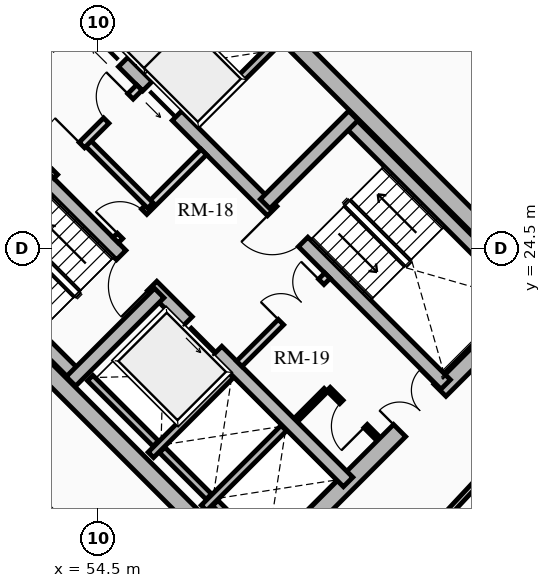
"""IFC4 building model, lengths in metres.
Left out: names, types, materials, properties, quantities, classifications, styles, units other than length and angle.
Written with IfcOpenShell. Run it as: python <this file> out.ifc"""

import sys

from ifc_helpers import new_model, si_unit, direction, frame, frame_2d, origin, place, context, subcontext, project, spatial, rectangle, extrude, source, transform, mapped, element, fill, save


model = new_model("IFC4")
c1 = context("Model", 3, precision=1e-05, world=origin(), true_north=direction((0.0, 1.0)))
c2 = subcontext(c1, "Body", "Model", "MODEL_VIEW")
j1 = project(units=[si_unit("LENGTHUNIT", "METRE"), si_unit("PLANEANGLEUNIT", "RADIAN")], contexts=[c1])
p1 = place(None, origin())
s1 = spatial("IfcSite", under=j1, at=p1, CompositionType="ELEMENT")
p2 = place(p1, origin())
s2 = spatial("IfcBuilding", under=s1, at=p2, CompositionType="ELEMENT")
p3 = place(p2, frame((0.0, 0.0, 116.71)))
s3 = spatial("IfcBuildingStorey", under=s2, at=p3, CompositionType="ELEMENT", Elevation=116.71)
for number, where, z_axis, x_axis in (
    (1, (58.737, 15.697, 0.0), (0.0, 0.0, 1.0), (-0.707, 0.707, 0.0)),
    (2, (66.303, 23.263, 0.0), (0.0, 0.0, 1.0), (-0.707, 0.707, 0.0)),
):
    element("IfcWall", number, at=place(p3, frame(where, z_axis=z_axis, x_axis=x_axis)), inside=s3, PredefinedType="SHEAR", context=c2, shape_type="SweptSolid", body=[
        extrude(rectangle(XDim=14.2, YDim=0.45, at=frame_2d((7.1, 0.0))), origin(), (0.0, 0.0, 1.0), 2.91),
    ])
p4 = place(p3, frame((58.578, 15.856, 0.0), z_axis=(0.0, 0.0, 1.0), x_axis=(0.707106781187, 0.707106781187, 0.0)))
e3 = element("IfcWall", 3, at=p4, inside=s3, PredefinedType="SHEAR", context=c2, shape_type="SweptSolid", body=[
    extrude(rectangle(XDim=10.7, YDim=0.45, at=frame_2d((5.35, 0.0))), origin(), (0.0, 0.0, 1.0), 2.91),
])
m1 = source(origin(), c2, "Body", "SweptSolid", [
    extrude(rectangle(XDim=1.5, YDim=2.02, at=frame_2d((0.75, 1.01))), frame((0.0, 0.235, 0.0), z_axis=(0.0, -1.0, 0.0), x_axis=(1.0, 0.0, 0.0)), (0.0, 0.0, 1.0), 0.47),
])
p5 = place(p4, frame((5.45, 0.0, 0.0)))
e4 = element("IfcOpeningElement", 4, at=p5, cuts=e3, PredefinedType="OPENING", context=c2, shape_type="MappedRepresentation", body=[
    mapped(m1, transform((0.0, 0.0, 0.0), x_axis=(1.0, 0.0, 0.0), y_axis=(0.0, 1.0, 0.0), z_axis=(0.0, 0.0, 1.0), scale=1.0)),
])
p6 = place(p3, frame((48.856, 25.578, 0.0), z_axis=(0.0, 0.0, 1.0), x_axis=(0.707106781187, 0.707106781187, 0.0)))
e5 = element("IfcWall", 5, at=p6, inside=s3, PredefinedType="SHEAR", context=c2, shape_type="SweptSolid", body=[
    extrude(rectangle(XDim=10.7, YDim=0.45, at=frame_2d((5.35, 0.0))), origin(), (0.0, 0.0, 1.0), 2.91),
])
p7 = place(p6, frame((4.6, 0.0, 0.0)))
e6 = element("IfcOpeningElement", 6, at=p7, cuts=e5, PredefinedType="OPENING", context=c2, shape_type="MappedRepresentation", body=[
    mapped(m1, transform((0.0, 0.0, 0.0), x_axis=(1.0, 0.0, 0.0), y_axis=(0.0, 1.0, 0.0), z_axis=(0.0, 0.0, 1.0), scale=1.0)),
])
p8 = place(p3, frame((61.078, 18.355, 0.0), z_axis=(0.0, 0.0, 1.0), x_axis=(-0.707106781187, 0.707106781187, 0.0)))
e7 = element("IfcWall", 7, at=p8, inside=s3, PredefinedType="SHEAR", context=c2, shape_type="SweptSolid", body=[
    extrude(rectangle(XDim=13.75, YDim=0.35, at=frame_2d((6.875, 0.0))), origin(), (0.0, 0.0, 1.0), 2.91),
])
m2 = source(origin(), c2, "Body", "SweptSolid", [
    extrude(rectangle(XDim=1.1, YDim=2.015, at=frame_2d((0.55, 1.007))), frame((0.0, 0.185, 0.0), z_axis=(0.0, -1.0, 0.0), x_axis=(1.0, 0.0, 0.0)), (0.0, 0.0, 1.0), 0.37),
])
p9 = place(p8, frame((4.875, 0.0, 0.0)))
e8 = element("IfcOpeningElement", 8, at=p9, cuts=e7, PredefinedType="OPENING", context=c2, shape_type="MappedRepresentation", body=[
    mapped(m2, transform((0.0, 0.0, 0.0), x_axis=(1.0, 0.0, 0.0), y_axis=(0.0, 1.0, 0.0), z_axis=(0.0, 0.0, 1.0), scale=1.0)),
])
m3 = source(origin(), c2, "Body", "SweptSolid", [
    extrude(rectangle(XDim=1.15, YDim=2.02, at=frame_2d((0.575, 1.01))), frame((0.0, 0.185, 0.0), z_axis=(0.0, -1.0, 0.0), x_axis=(1.0, 0.0, 0.0)), (0.0, 0.0, 1.0), 0.37),
])
p10 = place(p8, frame((7.295, 0.0, 0.0)))
e9 = element("IfcOpeningElement", 9, at=p10, cuts=e7, PredefinedType="OPENING", context=c2, shape_type="MappedRepresentation", body=[
    mapped(m3, transform((0.0, 0.0, 0.0), x_axis=(1.0, 0.0, 0.0), y_axis=(0.0, 1.0, 0.0), z_axis=(0.0, 0.0, 1.0), scale=1.0)),
])
p11 = place(p3, frame((63.645, 20.922, 0.0), z_axis=(0.0, 0.0, 1.0), x_axis=(-0.707106781187, 0.707106781187, 0.0)))
e10 = element("IfcWall", 10, at=p11, inside=s3, PredefinedType="SHEAR", context=c2, shape_type="SweptSolid", body=[
    extrude(rectangle(XDim=13.75, YDim=0.35, at=frame_2d((6.875, 0.0))), origin(), (0.0, 0.0, 1.0), 2.91),
])
p12 = place(p11, frame((10.0, 0.0, 0.0)))
e11 = element("IfcOpeningElement", 11, at=p12, cuts=e10, PredefinedType="OPENING", context=c2, shape_type="MappedRepresentation", body=[
    mapped(m2, transform((0.0, 0.0, 0.0), x_axis=(1.0, 0.0, 0.0), y_axis=(0.0, 1.0, 0.0), z_axis=(0.0, 0.0, 1.0), scale=1.0)),
])
p13 = place(p11, frame((12.0, 0.0, 0.0)))
e12 = element("IfcOpeningElement", 12, at=p13, cuts=e10, PredefinedType="OPENING", context=c2, shape_type="MappedRepresentation", body=[
    mapped(m2, transform((0.0, 0.0, 0.0), x_axis=(1.0, 0.0, 0.0), y_axis=(0.0, 1.0, 0.0), z_axis=(0.0, 0.0, 1.0), scale=1.0)),
])
p14 = place(p11, frame((5.305, 0.0, 0.0)))
e13 = element("IfcOpeningElement", 13, at=p14, cuts=e10, PredefinedType="OPENING", context=c2, shape_type="MappedRepresentation", body=[
    mapped(m3, transform((0.0, 0.0, 0.0), x_axis=(1.0, 0.0, 0.0), y_axis=(0.0, 1.0, 0.0), z_axis=(0.0, 0.0, 1.0), scale=1.0)),
])
p15 = place(p3, frame((53.922, 21.141, 0.0), z_axis=(0.0, 0.0, 1.0), x_axis=(-0.707088616009, 0.707124945897, 0.0)))
e14 = element("IfcWall", 14, at=p15, inside=s3, PredefinedType="SHEAR", context=c2, shape_type="SweptSolid", body=[
    extrude(rectangle(XDim=6.72, YDim=0.35, at=frame_2d((3.36, 0.0))), origin(), (0.0, 0.0, 1.0), 2.91),
])
p16 = place(p3, frame((53.784, 21.003, 0.0), z_axis=(0.0, 0.0, 1.0), x_axis=(0.707106781187, 0.707106781187, 0.0)))
e15 = element("IfcWall", 15, at=p16, inside=s3, PredefinedType="SHEAR", context=c2, shape_type="SweptSolid", body=[
    extrude(rectangle(XDim=3.285, YDim=0.35, at=frame_2d((1.643, 0.0))), origin(), (0.0, 0.0, 1.0), 2.91),
])
p17 = place(p3, frame((65.83, 23.107, 0.0), z_axis=(0.0, 0.0, 1.0), x_axis=(-0.707088616009, 0.707124945897, 0.0)))
e16 = element("IfcWall", 16, at=p17, inside=s3, PredefinedType="SHEAR", context=c2, shape_type="SweptSolid", body=[
    extrude(rectangle(XDim=6.72, YDim=0.35, at=frame_2d((3.36, 0.0))), origin(), (0.0, 0.0, 1.0), 2.91),
])
p18 = place(p3, frame((58.893, 25.674, 0.0), z_axis=(0.0, 0.0, 1.0), x_axis=(0.707106781187, 0.707106781187, 0.0)))
e17 = element("IfcWall", 17, at=p18, inside=s3, PredefinedType="SHEAR", context=c2, shape_type="SweptSolid", body=[
    extrude(rectangle(XDim=3.285, YDim=0.35, at=frame_2d((1.643, 0.0))), origin(), (0.0, 0.0, 1.0), 2.91),
])
p19 = place(p3, frame((55.888, 19.069, 0.0), z_axis=(0.0, 0.0, 1.0), x_axis=(0.707106781187, 0.707106781187, 0.0)))
e18 = element("IfcWall", 18, at=p19, inside=s3, PredefinedType="SHEAR", context=c2, shape_type="SweptSolid", body=[
    extrude(rectangle(XDim=2.97, YDim=0.2, at=frame_2d((1.485, 0.0))), origin(), (0.0, 0.0, 1.0), 2.91),
])
p20 = place(p3, frame((56.015, 19.366, 0.0), z_axis=(0.0, 0.0, 1.0), x_axis=(-0.707106781187, 0.707106781187, 0.0)))
e19 = element("IfcWall", 19, at=p20, inside=s3, PredefinedType="SHEAR", context=c2, shape_type="SweptSolid", body=[
    extrude(rectangle(XDim=2.44, YDim=0.2, at=frame_2d((1.22, 0.0))), origin(), (0.0, 0.0, 1.0), 2.91),
])
p21 = place(p3, frame((57.284, 17.673, 0.0), z_axis=(0.0, 0.0, 1.0), x_axis=(0.707147878904, 0.70706568108, 0.0)))
e20 = element("IfcWall", 20, at=p21, inside=s3, PredefinedType="SHEAR", context=c2, shape_type="SweptSolid", body=[
    extrude(rectangle(XDim=2.97, YDim=0.2, at=frame_2d((1.485, 0.0))), origin(), (0.0, 0.0, 1.0), 2.91),
])
p22 = place(p3, frame((57.412, 17.97, 0.0), z_axis=(0.0, 0.0, 1.0), x_axis=(-0.707106781187, 0.707106781187, 0.0)))
e21 = element("IfcWall", 21, at=p22, inside=s3, PredefinedType="SHEAR", context=c2, shape_type="SweptSolid", body=[
    extrude(rectangle(XDim=1.735, YDim=0.2, at=frame_2d((0.867, 0.0))), origin(), (0.0, 0.0, 1.0), 2.91),
])
p23 = place(p3, frame((58.737, 16.644, 0.0), z_axis=(0.0, 0.0, 1.0), x_axis=(-0.707032117043, 0.707181437447, 0.0)))
e22 = element("IfcWall", 22, at=p23, inside=s3, PredefinedType="SHEAR", context=c2, shape_type="SweptSolid", body=[
    extrude(rectangle(XDim=1.635, YDim=0.2, at=frame_2d((0.817, 0.0))), origin(), (0.0, 0.0, 1.0), 2.91),
])
p24 = place(p3, frame((57.062, 27.781, 0.0), z_axis=(0.0, 0.0, 1.0), x_axis=(0.707106781187, 0.707106781187, 0.0)))
e23 = element("IfcWall", 23, at=p24, inside=s3, PredefinedType="SHEAR", context=c2, shape_type="SweptSolid", body=[
    extrude(rectangle(XDim=2.97, YDim=0.2, at=frame_2d((1.485, 0.0))), origin(), (0.0, 0.0, 1.0), 2.91),
])
p25 = place(p3, frame((55.615, 29.227, 0.0), z_axis=(0.0, 0.0, 1.0), x_axis=(0.707147878904, 0.70706568108, 0.0)))
e24 = element("IfcWall", 24, at=p25, inside=s3, PredefinedType="SHEAR", context=c2, shape_type="SweptSolid", body=[
    extrude(rectangle(XDim=2.97, YDim=0.2, at=frame_2d((1.485, 0.0))), origin(), (0.0, 0.0, 1.0), 2.91),
])
p26 = place(p3, frame((58.214, 21.467, 0.0), z_axis=(0.0, 0.0, 1.0), x_axis=(0.707106781187, 0.707106781187, 0.0)))
e25 = element("IfcWall", 25, at=p26, inside=s3, PredefinedType="PARTITIONING", context=c2, shape_type="SweptSolid", body=[
    extrude(rectangle(XDim=3.28, YDim=0.2, at=frame_2d((1.64, 0.0))), origin(), (0.0, 0.0, 1.0), 2.655),
])
m4 = source(origin(), c2, "Body", "SweptSolid", [
    extrude(rectangle(XDim=1.5, YDim=2.02, at=frame_2d((0.75, 1.01))), frame((0.0, 0.11, 0.0), z_axis=(0.0, -1.0, 0.0), x_axis=(1.0, 0.0, 0.0)), (0.0, 0.0, 1.0), 0.22),
])
p27 = place(p26, frame((1.55, 0.0, 0.0)))
e26 = element("IfcOpeningElement", 26, at=p27, cuts=e25, PredefinedType="OPENING", context=c2, shape_type="MappedRepresentation", body=[
    mapped(m4, transform((0.0, 0.0, 0.0), x_axis=(1.0, 0.0, 0.0), y_axis=(0.0, 1.0, 0.0), z_axis=(0.0, 0.0, 1.0), scale=1.0)),
])
p28 = place(p3, frame((54.961, 24.719, 0.0), z_axis=(0.0, 0.0, 1.0), x_axis=(0.707106781187, 0.707106781187, 0.0)))
e27 = element("IfcWall", 27, at=p28, inside=s3, PredefinedType="PARTITIONING", context=c2, shape_type="SweptSolid", body=[
    extrude(rectangle(XDim=3.28, YDim=0.2, at=frame_2d((1.64, 0.0))), origin(), (0.0, 0.0, 1.0), 2.655),
])
m5 = source(origin(), c2, "Body", "SweptSolid", [
    extrude(rectangle(XDim=0.9, YDim=2.005, at=frame_2d((0.45, 1.002))), frame((0.0, 0.11, 0.0), z_axis=(0.0, -1.0, 0.0), x_axis=(1.0, 0.0, 0.0)), (0.0, 0.0, 1.0), 0.22),
])
p29 = place(p28, frame((0.16, 0.0, 0.0)))
e28 = element("IfcOpeningElement", 28, at=p29, cuts=e27, PredefinedType="OPENING", context=c2, shape_type="MappedRepresentation", body=[
    mapped(m5, transform((0.0, 0.0, 0.0), x_axis=(1.0, 0.0, 0.0), y_axis=(0.0, 1.0, 0.0), z_axis=(0.0, 0.0, 1.0), scale=1.0)),
])
p30 = place(p3, frame((55.874, 25.631, 0.0), z_axis=(0.0, 0.0, 1.0), x_axis=(-0.707157639372, 0.707055919343, 0.0)))
e29 = element("IfcWall", 29, at=p30, inside=s3, PredefinedType="PARTITIONING", context=c2, shape_type="SweptSolid", body=[
    extrude(rectangle(XDim=2.4, YDim=0.2, at=frame_2d((1.2, 0.0))), origin(), (0.0, 0.0, 1.0), 2.655),
])
p31 = place(p3, frame((53.264, 26.416, 0.0), z_axis=(0.0, 0.0, 1.0), x_axis=(0.707106781187, 0.707106781187, 0.0)))
e30 = element("IfcWall", 30, at=p31, inside=s3, PredefinedType="PARTITIONING", context=c2, shape_type="SweptSolid", body=[
    extrude(rectangle(XDim=3.28, YDim=0.2, at=frame_2d((1.64, 0.0))), origin(), (0.0, 0.0, 1.0), 2.655),
])
m6 = source(origin(), c2, "Body", "SweptSolid", [
    extrude(rectangle(XDim=1.0, YDim=2.015, at=frame_2d((0.5, 1.007))), frame((0.0, 0.11, 0.0), z_axis=(0.0, -1.0, 0.0), x_axis=(1.0, 0.0, 0.0)), (0.0, 0.0, 1.0), 0.22),
])
p32 = place(p31, frame((0.14, 0.0, 0.0)))
e31 = element("IfcOpeningElement", 31, at=p32, cuts=e30, PredefinedType="OPENING", context=c2, shape_type="MappedRepresentation", body=[
    mapped(m6, transform((0.0, 0.0, 0.0), x_axis=(1.0, 0.0, 0.0), y_axis=(0.0, 1.0, 0.0), z_axis=(0.0, 0.0, 1.0), scale=1.0)),
])
p33 = place(p31, frame((2.05, 0.0, 0.0)))
e32 = element("IfcOpeningElement", 32, at=p33, cuts=e30, PredefinedType="OPENING", context=c2, shape_type="MappedRepresentation", body=[
    mapped(m5, transform((0.0, 0.0, 0.0), x_axis=(1.0, 0.0, 0.0), y_axis=(0.0, 1.0, 0.0), z_axis=(0.0, 0.0, 1.0), scale=1.0)),
])
p34 = place(p3, frame((61.835, 19.529, 0.0), z_axis=(0.0, 0.0, 1.0), x_axis=(-0.707174592913, 0.707038962956, 0.0)))
e33 = element("IfcWall", 33, at=p34, inside=s3, PredefinedType="PARTITIONING", context=c2, shape_type="SweptSolid", body=[
    extrude(rectangle(XDim=1.8, YDim=0.125, at=frame_2d((0.9, 0.0))), origin(), (0.0, 0.0, 1.0), 2.655),
])
m7 = source(origin(), c2, "Body", "SweptSolid", [
    extrude(rectangle(XDim=0.9, YDim=2.005, at=frame_2d((0.45, 1.002))), frame((0.0, 0.073, 0.0), z_axis=(0.0, -1.0, 0.0), x_axis=(1.0, 0.0, 0.0)), (0.0, 0.0, 1.0), 0.145),
])
p35 = place(p34, frame((0.42, 0.0, 0.0)))
e34 = element("IfcOpeningElement", 34, at=p35, cuts=e33, PredefinedType="OPENING", context=c2, shape_type="MappedRepresentation", body=[
    mapped(m7, transform((0.0, 0.0, 0.0), x_axis=(1.0, 0.0, 0.0), y_axis=(0.0, 1.0, 0.0), z_axis=(0.0, 0.0, 1.0), scale=1.0)),
])
p36 = place(p3, frame((59.713, 19.996, 0.0), z_axis=(0.0, 0.0, 1.0), x_axis=(0.707217726, 0.706995818963, 0.0)))
e35 = element("IfcWall", 35, at=p36, inside=s3, PredefinedType="PARTITIONING", context=c2, shape_type="SweptSolid", body=[
    extrude(rectangle(XDim=1.1, YDim=0.125, at=frame_2d((0.55, 0.0))), origin(), (0.0, 0.0, 1.0), 2.655),
])
p37 = place(p3, frame((51.914, 18.914, 0.0), z_axis=(0.0, 0.0, 1.0), x_axis=(0.699999313799, -0.714143515465, 0.0)))
e36 = element("IfcWall", 36, at=p37, inside=s3, PredefinedType="PARTITIONING", context=c2, shape_type="SweptSolid", body=[
    extrude(rectangle(XDim=6.162, YDim=0.15, at=frame_2d((3.081, 0.0))), origin(), (0.0, 0.0, 1.0), 2.225),
])
p38 = place(p3, frame((62.903, 16.667, 0.0), z_axis=(0.0, 0.0, 1.0), x_axis=(0.682371947497, 0.731005147225, 0.0)))
e37 = element("IfcWall", 37, at=p38, inside=s3, PredefinedType="PARTITIONING", context=c2, shape_type="SweptSolid", body=[
    extrude(rectangle(XDim=6.642, YDim=0.15, at=frame_2d((3.321, 0.0))), origin(), (0.0, 0.0, 1.0), 2.225),
])
m8 = source(origin(), c2, "Body", "SweptSolid", [
    extrude(rectangle(XDim=1.1, YDim=2.015, at=frame_2d((0.55, 1.007))), frame((0.0, 0.025, 0.0), z_axis=(0.0, -1.0, 0.0), x_axis=(1.0, 0.0, 0.0)), (0.0, 0.0, 1.0), 0.05),
])
p39 = place(p9, origin())
e38 = element("IfcDoor", 38, at=p39, inside=s3, OperationType="SLIDING_TO_LEFT", PredefinedType="DOOR", context=c2, shape_type="MappedRepresentation", body=[
    mapped(m8, transform((0.0, 0.0, 0.0), x_axis=(1.0, 0.0, 0.0), y_axis=(0.0, 1.0, 0.0), z_axis=(0.0, 0.0, 1.0), scale=1.0)),
])
fill(e8, e38)
p40 = place(p12, origin())
e39 = element("IfcDoor", 39, at=p40, inside=s3, OperationType="SLIDING_TO_LEFT", PredefinedType="DOOR", context=c2, shape_type="MappedRepresentation", body=[
    mapped(m8, transform((0.0, 0.0, 0.0), x_axis=(1.0, 0.0, 0.0), y_axis=(0.0, 1.0, 0.0), z_axis=(0.0, 0.0, 1.0), scale=1.0)),
])
fill(e11, e39)
p41 = place(p13, origin())
e40 = element("IfcDoor", 40, at=p41, inside=s3, OperationType="SLIDING_TO_RIGHT", PredefinedType="DOOR", context=c2, shape_type="MappedRepresentation", body=[
    mapped(m8, transform((0.0, 0.0, 0.0), x_axis=(1.0, 0.0, 0.0), y_axis=(0.0, 1.0, 0.0), z_axis=(0.0, 0.0, 1.0), scale=1.0)),
])
fill(e12, e40)
m9 = source(origin(), c2, "Body", "SweptSolid", [
    extrude(rectangle(XDim=1.15, YDim=2.02, at=frame_2d((0.575, 1.01))), frame((0.0, 0.025, 0.0), z_axis=(0.0, -1.0, 0.0), x_axis=(1.0, 0.0, 0.0)), (0.0, 0.0, 1.0), 0.05),
])
p42 = place(p10, origin())
e41 = element("IfcDoor", 41, at=p42, inside=s3, OperationType="SINGLE_SWING_LEFT", PredefinedType="DOOR", context=c2, shape_type="MappedRepresentation", body=[
    mapped(m9, transform((0.0, 0.0, 0.0), x_axis=(1.0, 0.0, 0.0), y_axis=(0.0, 1.0, 0.0), z_axis=(0.0, 0.0, 1.0), scale=1.0)),
])
fill(e9, e41)
p43 = place(p14, origin())
e42 = element("IfcDoor", 42, at=p43, inside=s3, OperationType="SINGLE_SWING_RIGHT", PredefinedType="DOOR", context=c2, shape_type="MappedRepresentation", body=[
    mapped(m9, transform((0.0, 0.0, 0.0), x_axis=(1.0, 0.0, 0.0), y_axis=(0.0, 1.0, 0.0), z_axis=(0.0, 0.0, 1.0), scale=1.0)),
])
fill(e13, e42)
m10 = source(origin(), c2, "Body", "SweptSolid", [
    extrude(rectangle(XDim=1.5, YDim=2.02, at=frame_2d((0.75, 1.01))), frame((0.0, 0.025, 0.0), z_axis=(0.0, -1.0, 0.0), x_axis=(1.0, 0.0, 0.0)), (0.0, 0.0, 1.0), 0.05),
])
p44 = place(p5, origin())
e43 = element("IfcDoor", 43, at=p44, inside=s3, OperationType="DOUBLE_DOOR_SINGLE_SWING", PredefinedType="DOOR", context=c2, shape_type="MappedRepresentation", body=[
    mapped(m10, transform((0.0, 0.0, 0.0), x_axis=(1.0, 0.0, 0.0), y_axis=(0.0, 1.0, 0.0), z_axis=(0.0, 0.0, 1.0), scale=1.0)),
])
fill(e4, e43)
p45 = place(p27, origin())
e44 = element("IfcDoor", 44, at=p45, inside=s3, OperationType="DOUBLE_DOOR_SINGLE_SWING", PredefinedType="DOOR", context=c2, shape_type="MappedRepresentation", body=[
    mapped(m10, transform((0.0, 0.0, 0.0), x_axis=(1.0, 0.0, 0.0), y_axis=(0.0, 1.0, 0.0), z_axis=(0.0, 0.0, 1.0), scale=1.0)),
])
fill(e26, e44)
m11 = source(origin(), c2, "Body", "SweptSolid", [
    extrude(rectangle(XDim=0.9, YDim=2.005, at=frame_2d((0.45, 1.002))), frame((0.0, 0.025, 0.0), z_axis=(0.0, -1.0, 0.0), x_axis=(1.0, 0.0, 0.0)), (0.0, 0.0, 1.0), 0.05),
])
p46 = place(p29, origin())
e45 = element("IfcDoor", 45, at=p46, inside=s3, OperationType="SINGLE_SWING_LEFT", PredefinedType="DOOR", context=c2, shape_type="MappedRepresentation", body=[
    mapped(m11, transform((0.0, 0.0, 0.0), x_axis=(1.0, 0.0, 0.0), y_axis=(0.0, 1.0, 0.0), z_axis=(0.0, 0.0, 1.0), scale=1.0)),
])
fill(e28, e45)
m12 = source(origin(), c2, "Body", "SweptSolid", [
    extrude(rectangle(XDim=1.0, YDim=2.015, at=frame_2d((0.5, 1.007))), frame((0.0, 0.025, 0.0), z_axis=(0.0, -1.0, 0.0), x_axis=(1.0, 0.0, 0.0)), (0.0, 0.0, 1.0), 0.05),
])
p47 = place(p32, origin())
e46 = element("IfcDoor", 46, at=p47, inside=s3, OperationType="SINGLE_SWING_RIGHT", PredefinedType="DOOR", context=c2, shape_type="MappedRepresentation", body=[
    mapped(m12, transform((0.0, 0.0, 0.0), x_axis=(1.0, 0.0, 0.0), y_axis=(0.0, 1.0, 0.0), z_axis=(0.0, 0.0, 1.0), scale=1.0)),
])
fill(e31, e46)
p48 = place(p35, origin())
e47 = element("IfcDoor", 47, at=p48, inside=s3, OperationType="SINGLE_SWING_LEFT", PredefinedType="DOOR", context=c2, shape_type="MappedRepresentation", body=[
    mapped(m11, transform((0.0, 0.0, 0.0), x_axis=(1.0, 0.0, 0.0), y_axis=(0.0, 1.0, 0.0), z_axis=(0.0, 0.0, 1.0), scale=1.0)),
])
fill(e34, e47)
p49 = place(p33, origin())
e48 = element("IfcDoor", 48, at=p49, inside=s3, OperationType="SINGLE_SWING_RIGHT", PredefinedType="DOOR", context=c2, shape_type="MappedRepresentation", body=[
    mapped(m11, transform((0.0, 0.0, 0.0), x_axis=(1.0, 0.0, 0.0), y_axis=(0.0, 1.0, 0.0), z_axis=(0.0, 0.0, 1.0), scale=1.0)),
])
fill(e32, e48)
save(model, sys.argv[1])
